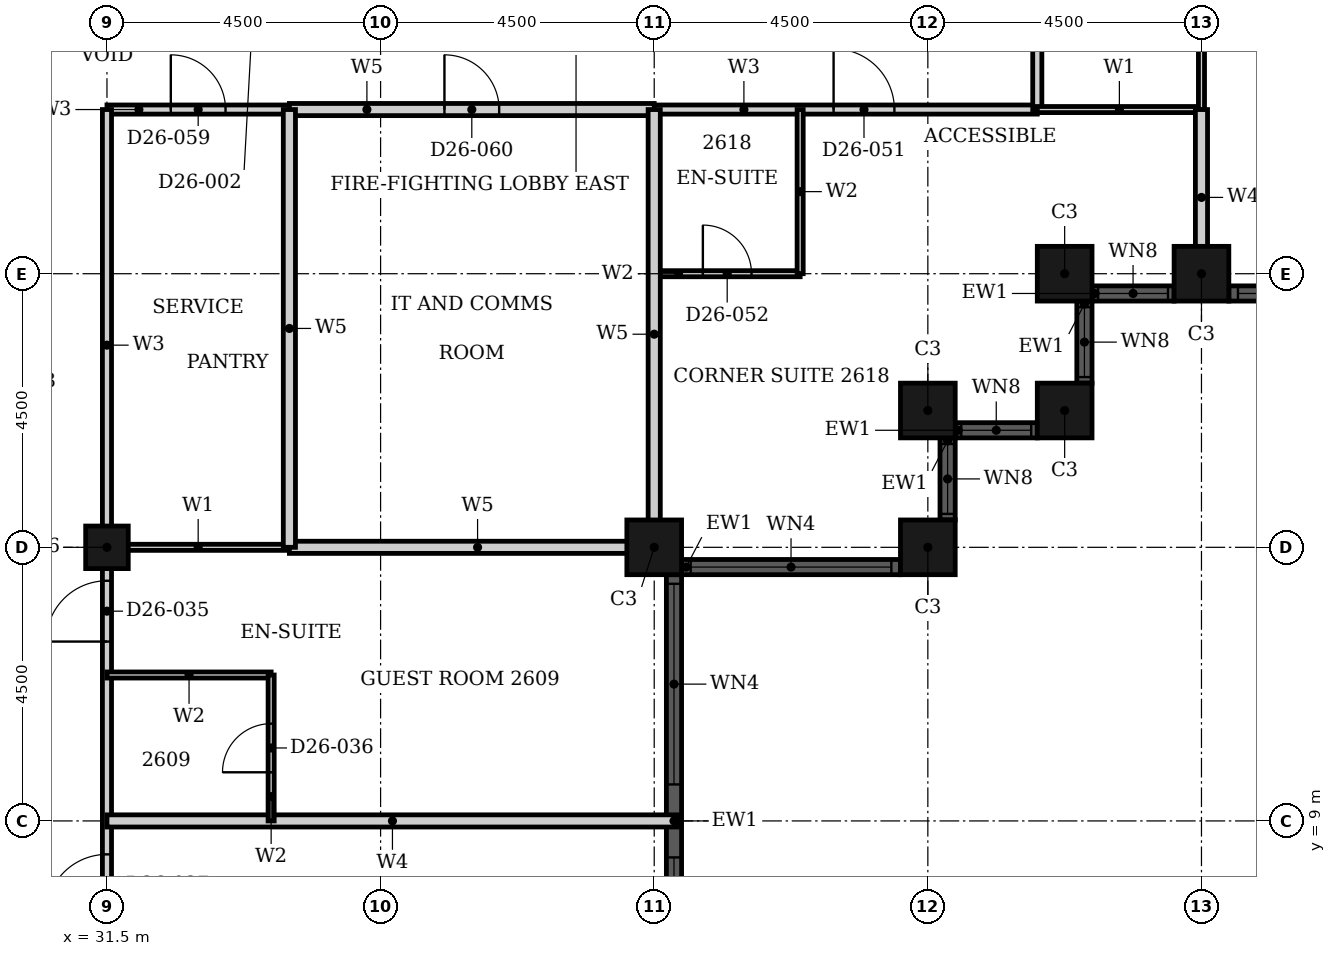
"""IFC4 building model, lengths in metres.
Left out: names, types, materials, properties, quantities, classifications, styles, units other than length and angle.
Written with IfcOpenShell. Run it as: python <this file> out.ifc"""

import sys

from ifc_helpers import new_model, si_unit, direction, frame, frame_2d, origin, origin_2d, place, context, subcontext, project, spatial, rectangle, hollow_rectangle, extrude, element, fill, save


model = new_model("IFC4")
c1 = context("Model", 3, precision=1e-05, world=origin(), true_north=direction((0.0, 1.0)))
c2 = subcontext(c1, "Body", "Model", "MODEL_VIEW")
j1 = project(units=[si_unit("LENGTHUNIT", "METRE"), si_unit("PLANEANGLEUNIT", "RADIAN")], contexts=[c1])
p1 = place(None, origin())
s1 = spatial("IfcSite", under=j1, at=p1, CompositionType="ELEMENT")
p2 = place(p1, origin())
s2 = spatial("IfcBuilding", under=s1, at=p2, CompositionType="ELEMENT")
p3 = place(p2, frame((0.0, 0.0, 108.0)))
s3 = spatial("IfcBuildingStorey", under=s2, at=p3, CompositionType="ELEMENT", Elevation=108.0)
for number, where, z_axis, x_axis in (
    (1, (40.5, 13.5, 0.0), (0.0, 0.0, 1.0), (1.0, 0.0, 0.0)),
    (2, (45.0, 13.5, 0.0), (0.0, 0.0, 1.0), (1.0, 0.0, 0.0)),
    (3, (45.0, 15.75, 0.0), (0.0, 0.0, 1.0), (1.0, 0.0, 0.0)),
    (4, (47.25, 15.75, 0.0), (0.0, 0.0, 1.0), (1.0, 0.0, 0.0)),
    (5, (47.25, 18.0, 0.0), (0.0, 0.0, 1.0), (1.0, 0.0, 0.0)),
    (6, (49.5, 18.0, 0.0), (0.0, 0.0, 1.0), (1.0, 0.0, 0.0)),
):
    element("IfcColumn", number, at=place(p3, frame(where, z_axis=z_axis, x_axis=x_axis)), inside=s3, PredefinedType="COLUMN", context=c2, shape_type="SweptSolid", body=[
        extrude(hollow_rectangle(XDim=0.9, YDim=0.9, WallThickness=0.028, at=origin_2d()), origin(), (0.0, 0.0, 1.0), 3.6),
    ])
p4 = place(p3, frame((31.5, 13.5, 0.0), z_axis=(0.0, 0.0, 1.0), x_axis=(1.0, 0.0, 0.0)))
e7 = element("IfcColumn", 7, at=p4, inside=s3, PredefinedType="COLUMN", context=c2, shape_type="SweptSolid", body=[
    extrude(hollow_rectangle(XDim=0.7, YDim=0.7, WallThickness=0.022, at=origin_2d()), origin(), (0.0, 0.0, 1.0), 3.6),
])
p5 = place(p3, frame((40.825, 4.95, 0.0), z_axis=(0.0, 0.0, 1.0), x_axis=(0.0, 1.0, 0.0)))
e8 = element("IfcWall", 8, at=p5, inside=s3, PredefinedType="SOLIDWALL", context=c2, shape_type="SweptSolid", body=[
    extrude(rectangle(XDim=8.1, YDim=0.25, at=frame_2d((4.05, 0.0))), origin(), (0.0, 0.0, 1.0), 3.6),
])
p6 = place(p5, frame((0.15, 0.0, 0.9)))
e9 = element("IfcOpeningElement", 9, at=p6, cuts=e8, PredefinedType="OPENING", context=c2, shape_type="SweptSolid", body=[
    extrude(rectangle(XDim=3.3, YDim=2.08, at=frame_2d((1.65, 1.04))), frame((0.0, 0.135, 0.0), z_axis=(0.0, -1.0, 0.0), x_axis=(1.0, 0.0, 0.0)), (0.0, 0.0, 1.0), 0.27),
])
p7 = place(p5, frame((4.65, 0.0, 0.9)))
e10 = element("IfcOpeningElement", 10, at=p7, cuts=e8, PredefinedType="OPENING", context=c2, shape_type="SweptSolid", body=[
    extrude(rectangle(XDim=3.3, YDim=2.08, at=frame_2d((1.65, 1.04))), frame((0.0, 0.135, 0.0), z_axis=(0.0, -1.0, 0.0), x_axis=(1.0, 0.0, 0.0)), (0.0, 0.0, 1.0), 0.27),
])
p8 = place(p3, frame((40.95, 13.175, 0.0), z_axis=(0.0, 0.0, 1.0), x_axis=(1.0, 0.0, 0.0)))
e11 = element("IfcWall", 11, at=p8, inside=s3, PredefinedType="SOLIDWALL", context=c2, shape_type="SweptSolid", body=[
    extrude(rectangle(XDim=3.6, YDim=0.25, at=frame_2d((1.8, 0.0))), origin(), (0.0, 0.0, 1.0), 3.6),
])
p9 = place(p8, frame((0.15, 0.0, 0.9)))
e12 = element("IfcOpeningElement", 12, at=p9, cuts=e11, PredefinedType="OPENING", context=c2, shape_type="SweptSolid", body=[
    extrude(rectangle(XDim=3.3, YDim=2.08, at=frame_2d((1.65, 1.04))), frame((0.0, 0.135, 0.0), z_axis=(0.0, -1.0, 0.0), x_axis=(1.0, 0.0, 0.0)), (0.0, 0.0, 1.0), 0.27),
])
p10 = place(p3, frame((45.325, 13.95, 0.0), z_axis=(0.0, 0.0, 1.0), x_axis=(0.0, 1.0, 0.0)))
e13 = element("IfcWall", 13, at=p10, inside=s3, PredefinedType="SOLIDWALL", context=c2, shape_type="SweptSolid", body=[
    extrude(rectangle(XDim=1.35, YDim=0.25, at=frame_2d((0.675, 0.0))), origin(), (0.0, 0.0, 1.0), 3.6),
])
p11 = place(p10, frame((0.1, 0.0, 0.9)))
e14 = element("IfcOpeningElement", 14, at=p11, cuts=e13, PredefinedType="OPENING", context=c2, shape_type="SweptSolid", body=[
    extrude(rectangle(XDim=1.15, YDim=2.08, at=frame_2d((0.575, 1.04))), frame((0.0, 0.135, 0.0), z_axis=(0.0, -1.0, 0.0), x_axis=(1.0, 0.0, 0.0)), (0.0, 0.0, 1.0), 0.27),
])
p12 = place(p3, frame((45.45, 15.425, 0.0), z_axis=(0.0, 0.0, 1.0), x_axis=(1.0, 0.0, 0.0)))
e15 = element("IfcWall", 15, at=p12, inside=s3, PredefinedType="SOLIDWALL", context=c2, shape_type="SweptSolid", body=[
    extrude(rectangle(XDim=1.35, YDim=0.25, at=frame_2d((0.675, 0.0))), origin(), (0.0, 0.0, 1.0), 3.6),
])
p13 = place(p12, frame((0.1, 0.0, 0.9)))
e16 = element("IfcOpeningElement", 16, at=p13, cuts=e15, PredefinedType="OPENING", context=c2, shape_type="SweptSolid", body=[
    extrude(rectangle(XDim=1.15, YDim=2.08, at=frame_2d((0.575, 1.04))), frame((0.0, 0.135, 0.0), z_axis=(0.0, -1.0, 0.0), x_axis=(1.0, 0.0, 0.0)), (0.0, 0.0, 1.0), 0.27),
])
p14 = place(p3, frame((47.575, 16.2, 0.0), z_axis=(0.0, 0.0, 1.0), x_axis=(0.0, 1.0, 0.0)))
e17 = element("IfcWall", 17, at=p14, inside=s3, PredefinedType="SOLIDWALL", context=c2, shape_type="SweptSolid", body=[
    extrude(rectangle(XDim=1.35, YDim=0.25, at=frame_2d((0.675, 0.0))), origin(), (0.0, 0.0, 1.0), 3.6),
])
p15 = place(p14, frame((0.1, 0.0, 0.9)))
e18 = element("IfcOpeningElement", 18, at=p15, cuts=e17, PredefinedType="OPENING", context=c2, shape_type="SweptSolid", body=[
    extrude(rectangle(XDim=1.15, YDim=2.08, at=frame_2d((0.575, 1.04))), frame((0.0, 0.135, 0.0), z_axis=(0.0, -1.0, 0.0), x_axis=(1.0, 0.0, 0.0)), (0.0, 0.0, 1.0), 0.27),
])
p16 = place(p3, frame((47.7, 17.675, 0.0), z_axis=(0.0, 0.0, 1.0), x_axis=(1.0, 0.0, 0.0)))
e19 = element("IfcWall", 19, at=p16, inside=s3, PredefinedType="SOLIDWALL", context=c2, shape_type="SweptSolid", body=[
    extrude(rectangle(XDim=1.35, YDim=0.25, at=frame_2d((0.675, 0.0))), origin(), (0.0, 0.0, 1.0), 3.6),
])
p17 = place(p16, frame((0.1, 0.0, 0.9)))
e20 = element("IfcOpeningElement", 20, at=p17, cuts=e19, PredefinedType="OPENING", context=c2, shape_type="SweptSolid", body=[
    extrude(rectangle(XDim=1.15, YDim=2.08, at=frame_2d((0.575, 1.04))), frame((0.0, 0.135, 0.0), z_axis=(0.0, -1.0, 0.0), x_axis=(1.0, 0.0, 0.0)), (0.0, 0.0, 1.0), 0.27),
])
p18 = place(p3, frame((49.95, 17.675, 0.0), z_axis=(0.0, 0.0, 1.0), x_axis=(1.0, 0.0, 0.0)))
e21 = element("IfcWall", 21, at=p18, inside=s3, PredefinedType="SOLIDWALL", context=c2, shape_type="SweptSolid", body=[
    extrude(rectangle(XDim=8.1, YDim=0.25, at=frame_2d((4.05, 0.0))), origin(), (0.0, 0.0, 1.0), 3.6),
])
p19 = place(p18, frame((0.15, 0.0, 0.9)))
e22 = element("IfcOpeningElement", 22, at=p19, cuts=e21, PredefinedType="OPENING", context=c2, shape_type="SweptSolid", body=[
    extrude(rectangle(XDim=3.3, YDim=2.08, at=frame_2d((1.65, 1.04))), frame((0.0, 0.135, 0.0), z_axis=(0.0, -1.0, 0.0), x_axis=(1.0, 0.0, 0.0)), (0.0, 0.0, 1.0), 0.27),
])
p20 = place(p18, frame((4.65, 0.0, 0.9)))
e23 = element("IfcOpeningElement", 23, at=p20, cuts=e21, PredefinedType="OPENING", context=c2, shape_type="SweptSolid", body=[
    extrude(rectangle(XDim=3.3, YDim=2.08, at=frame_2d((1.65, 1.04))), frame((0.0, 0.135, 0.0), z_axis=(0.0, -1.0, 0.0), x_axis=(1.0, 0.0, 0.0)), (0.0, 0.0, 1.0), 0.27),
])
p21 = place(p3, frame((40.5, 20.7, 0.0), z_axis=(0.0, 0.0, 1.0), x_axis=(1.0, 0.0, 0.0)))
e24 = element("IfcWall", 24, at=p21, inside=s3, PredefinedType="PARTITIONING", context=c2, shape_type="SweptSolid", body=[
    extrude(rectangle(XDim=6.3, YDim=0.15, at=frame_2d((3.15, 0.0))), origin(), (0.0, 0.0, 1.0), 3.3),
])
p22 = place(p21, frame((2.95, 0.0, 0.0)))
e25 = element("IfcOpeningElement", 25, at=p22, cuts=e24, PredefinedType="OPENING", context=c2, shape_type="SweptSolid", body=[
    extrude(rectangle(XDim=1.0, YDim=2.1, at=frame_2d((0.5, 1.05))), frame((0.0, 0.085, 0.0), z_axis=(0.0, -1.0, 0.0), x_axis=(1.0, 0.0, 0.0)), (0.0, 0.0, 1.0), 0.17),
])
p23 = place(p3, frame((31.5, 20.7, 0.0), z_axis=(0.0, 0.0, 1.0), x_axis=(1.0, 0.0, 0.0)))
e26 = element("IfcWall", 26, at=p23, inside=s3, PredefinedType="PARTITIONING", context=c2, shape_type="SweptSolid", body=[
    extrude(rectangle(XDim=3.0, YDim=0.15, at=frame_2d((1.5, 0.0))), origin(), (0.0, 0.0, 1.0), 3.3),
])
p24 = place(p23, frame((1.05, 0.0, 0.0)))
e27 = element("IfcOpeningElement", 27, at=p24, cuts=e26, PredefinedType="OPENING", context=c2, shape_type="SweptSolid", body=[
    extrude(rectangle(XDim=0.9, YDim=2.1, at=frame_2d((0.45, 1.05))), frame((0.0, 0.085, 0.0), z_axis=(0.0, -1.0, 0.0), x_axis=(1.0, 0.0, 0.0)), (0.0, 0.0, 1.0), 0.17),
])
p25 = place(p3, frame((31.5, 4.5, 0.0), z_axis=(0.0, 0.0, 1.0), x_axis=(0.0, 1.0, 0.0)))
e28 = element("IfcWall", 28, at=p25, inside=s3, PredefinedType="PARTITIONING", context=c2, shape_type="SweptSolid", body=[
    extrude(rectangle(XDim=16.2, YDim=0.15, at=frame_2d((8.1, 0.0))), origin(), (0.0, 0.0, 1.0), 2.58),
])
p26 = place(p25, frame((7.45, 0.0, 0.0)))
e29 = element("IfcOpeningElement", 29, at=p26, cuts=e28, PredefinedType="OPENING", context=c2, shape_type="SweptSolid", body=[
    extrude(rectangle(XDim=1.0, YDim=2.1, at=frame_2d((0.5, 1.05))), frame((0.0, 0.085, 0.0), z_axis=(0.0, -1.0, 0.0), x_axis=(1.0, 0.0, 0.0)), (0.0, 0.0, 1.0), 0.17),
])
p27 = place(p25, frame((2.95, 0.0, 0.0)))
e30 = element("IfcOpeningElement", 30, at=p27, cuts=e28, PredefinedType="OPENING", context=c2, shape_type="SweptSolid", body=[
    extrude(rectangle(XDim=1.0, YDim=2.1, at=frame_2d((0.5, 1.05))), frame((0.0, 0.085, 0.0), z_axis=(0.0, -1.0, 0.0), x_axis=(1.0, 0.0, 0.0)), (0.0, 0.0, 1.0), 0.17),
])
p28 = place(p3, frame((46.8, 20.7, 0.0), z_axis=(0.0, 0.0, 1.0), x_axis=(0.0, 1.0, 0.0)))
e31 = element("IfcWall", 31, at=p28, inside=s3, PredefinedType="PARTITIONING", context=c2, shape_type="SweptSolid", body=[
    extrude(rectangle(XDim=6.3, YDim=0.15, at=frame_2d((3.15, 0.0))), origin(), (0.0, 0.0, 1.0), 3.3),
])
p29 = place(p28, frame((2.625, 0.0, 0.0)))
e32 = element("IfcOpeningElement", 32, at=p29, cuts=e31, PredefinedType="OPENING", context=c2, shape_type="SweptSolid", body=[
    extrude(rectangle(XDim=0.95, YDim=2.1, at=frame_2d((0.475, 1.05))), frame((0.0, 0.085, 0.0), z_axis=(0.0, -1.0, 0.0), x_axis=(1.0, 0.0, 0.0)), (0.0, 0.0, 1.0), 0.17),
])
p30 = place(p3, frame((31.5, 13.5, 0.0), z_axis=(0.0, 0.0, 1.0), x_axis=(1.0, 0.0, 0.0)))
e33 = element("IfcWall", 33, at=p30, inside=s3, PredefinedType="PARTITIONING", context=c2, shape_type="SweptSolid", body=[
    extrude(rectangle(XDim=3.0, YDim=0.1, at=frame_2d((1.5, 0.0))), origin(), (0.0, 0.0, 1.0), 2.38),
])
p31 = place(p3, frame((46.8, 20.7, 0.0), z_axis=(0.0, 0.0, 1.0), x_axis=(1.0, 0.0, 0.0)))
e34 = element("IfcWall", 34, at=p31, inside=s3, PredefinedType="PARTITIONING", context=c2, shape_type="SweptSolid", body=[
    extrude(rectangle(XDim=2.7, YDim=0.1, at=frame_2d((1.35, 0.0))), origin(), (0.0, 0.0, 1.0), 3.3),
])
p32 = place(p3, frame((49.5, 20.7, 0.0), z_axis=(0.0, 0.0, 1.0), x_axis=(0.0, 1.0, 0.0)))
e35 = element("IfcWall", 35, at=p32, inside=s3, PredefinedType="PARTITIONING", context=c2, shape_type="SweptSolid", body=[
    extrude(rectangle(XDim=6.3, YDim=0.1, at=frame_2d((3.15, 0.0))), origin(), (0.0, 0.0, 1.0), 2.38),
])
p33 = place(p3, frame((31.5, 9.0, 0.0), z_axis=(0.0, 0.0, 1.0), x_axis=(1.0, 0.0, 0.0)))
e36 = element("IfcWall", 36, at=p33, inside=s3, PredefinedType="PARTITIONING", context=c2, shape_type="SweptSolid", body=[
    extrude(rectangle(XDim=9.39, YDim=0.2, at=frame_2d((4.695, 0.0))), origin(), (0.0, 0.0, 1.0), 3.3),
])
p34 = place(p3, frame((49.5, 17.81, 0.0), z_axis=(0.0, 0.0, 1.0), x_axis=(0.0, 1.0, 0.0)))
e37 = element("IfcWall", 37, at=p34, inside=s3, PredefinedType="PARTITIONING", context=c2, shape_type="SweptSolid", body=[
    extrude(rectangle(XDim=2.89, YDim=0.2, at=frame_2d((1.445, 0.0))), origin(), (0.0, 0.0, 1.0), 2.38),
])
p35 = place(p3, frame((31.5, 11.4, 0.0), z_axis=(0.0, 0.0, 1.0), x_axis=(1.0, 0.0, 0.0)))
e38 = element("IfcWall", 38, at=p35, inside=s3, PredefinedType="PARTITIONING", context=c2, shape_type="SweptSolid", body=[
    extrude(rectangle(XDim=2.7, YDim=0.1, at=frame_2d((1.35, 0.0))), origin(), (0.0, 0.0, 1.0), 3.3),
])
p36 = place(p3, frame((40.5, 18.0, 0.0), z_axis=(0.0, 0.0, 1.0), x_axis=(1.0, 0.0, 0.0)))
e39 = element("IfcWall", 39, at=p36, inside=s3, PredefinedType="PARTITIONING", context=c2, shape_type="SweptSolid", body=[
    extrude(rectangle(XDim=2.4, YDim=0.1, at=frame_2d((1.2, 0.0))), origin(), (0.0, 0.0, 1.0), 3.3),
])
p37 = place(p36, frame((0.8, 0.0, 0.0)))
e40 = element("IfcOpeningElement", 40, at=p37, cuts=e39, PredefinedType="OPENING", context=c2, shape_type="SweptSolid", body=[
    extrude(rectangle(XDim=0.8, YDim=2.1, at=frame_2d((0.4, 1.05))), frame((0.0, 0.06, 0.0), z_axis=(0.0, -1.0, 0.0), x_axis=(1.0, 0.0, 0.0)), (0.0, 0.0, 1.0), 0.12),
])
p38 = place(p3, frame((34.2, 9.0, 0.0), z_axis=(0.0, 0.0, 1.0), x_axis=(0.0, 1.0, 0.0)))
e41 = element("IfcWall", 41, at=p38, inside=s3, PredefinedType="PARTITIONING", context=c2, shape_type="SweptSolid", body=[
    extrude(rectangle(XDim=2.4, YDim=0.1, at=frame_2d((1.2, 0.0))), origin(), (0.0, 0.0, 1.0), 3.3),
])
p39 = place(p38, frame((0.8, 0.0, 0.0)))
e42 = element("IfcOpeningElement", 42, at=p39, cuts=e41, PredefinedType="OPENING", context=c2, shape_type="SweptSolid", body=[
    extrude(rectangle(XDim=0.8, YDim=2.1, at=frame_2d((0.4, 1.05))), frame((0.0, 0.06, 0.0), z_axis=(0.0, -1.0, 0.0), x_axis=(1.0, 0.0, 0.0)), (0.0, 0.0, 1.0), 0.12),
])
p40 = place(p3, frame((42.9, 18.0, 0.0), z_axis=(0.0, 0.0, 1.0), x_axis=(0.0, 1.0, 0.0)))
e43 = element("IfcWall", 43, at=p40, inside=s3, PredefinedType="PARTITIONING", context=c2, shape_type="SweptSolid", body=[
    extrude(rectangle(XDim=2.7, YDim=0.1, at=frame_2d((1.35, 0.0))), origin(), (0.0, 0.0, 1.0), 3.3),
])
p41 = place(p3, frame((34.5, 13.5, 0.0), z_axis=(0.0, 0.0, 1.0), x_axis=(1.0, 0.0, 0.0)))
e44 = element("IfcWall", 44, at=p41, inside=s3, PredefinedType="PARTITIONING", context=c2, shape_type="SweptSolid", body=[
    extrude(rectangle(XDim=6.19, YDim=0.2, at=frame_2d((3.095, 0.0))), origin(), (0.0, 0.0, 1.0), 2.38),
])
p42 = place(p3, frame((34.5, 20.7, 0.0), z_axis=(0.0, 0.0, 1.0), x_axis=(1.0, 0.0, 0.0)))
e45 = element("IfcWall", 45, at=p42, inside=s3, PredefinedType="PARTITIONING", context=c2, shape_type="SweptSolid", body=[
    extrude(rectangle(XDim=6.0, YDim=0.2, at=frame_2d((3.0, 0.0))), origin(), (0.0, 0.0, 1.0), 3.3),
])
p43 = place(p42, frame((2.55, 0.0, 0.0)))
e46 = element("IfcOpeningElement", 46, at=p43, cuts=e45, PredefinedType="OPENING", context=c2, shape_type="SweptSolid", body=[
    extrude(rectangle(XDim=0.9, YDim=2.1, at=frame_2d((0.45, 1.05))), frame((0.0, 0.11, 0.0), z_axis=(0.0, -1.0, 0.0), x_axis=(1.0, 0.0, 0.0)), (0.0, 0.0, 1.0), 0.22),
])
p44 = place(p3, frame((34.5, 13.5, 0.0), z_axis=(0.0, 0.0, 1.0), x_axis=(0.0, 1.0, 0.0)))
e47 = element("IfcWall", 47, at=p44, inside=s3, PredefinedType="PARTITIONING", context=c2, shape_type="SweptSolid", body=[
    extrude(rectangle(XDim=7.2, YDim=0.2, at=frame_2d((3.6, 0.0))), origin(), (0.0, 0.0, 1.0), 3.3),
])
p45 = place(p3, frame((40.5, 13.31, 0.0), z_axis=(0.0, 0.0, 1.0), x_axis=(0.0, 1.0, 0.0)))
e48 = element("IfcWall", 48, at=p45, inside=s3, PredefinedType="PARTITIONING", context=c2, shape_type="SweptSolid", body=[
    extrude(rectangle(XDim=7.39, YDim=0.2, at=frame_2d((3.695, 0.0))), origin(), (0.0, 0.0, 1.0), 3.3),
])
p46 = place(p6, origin())
e49 = element("IfcWindow", 49, at=p46, inside=s3, PartitioningType="SINGLE_PANEL", PredefinedType="WINDOW", context=c2, shape_type="SweptSolid", body=[
    extrude(rectangle(XDim=3.3, YDim=2.08, at=frame_2d((1.65, 1.04))), frame((0.0, 0.03, 0.0), z_axis=(0.0, -1.0, 0.0), x_axis=(1.0, 0.0, 0.0)), (0.0, 0.0, 1.0), 0.06),
])
fill(e9, e49)
p47 = place(p7, origin())
e50 = element("IfcWindow", 50, at=p47, inside=s3, PartitioningType="SINGLE_PANEL", PredefinedType="WINDOW", context=c2, shape_type="SweptSolid", body=[
    extrude(rectangle(XDim=3.3, YDim=2.08, at=frame_2d((1.65, 1.04))), frame((0.0, 0.03, 0.0), z_axis=(0.0, -1.0, 0.0), x_axis=(1.0, 0.0, 0.0)), (0.0, 0.0, 1.0), 0.06),
])
fill(e10, e50)
p48 = place(p9, origin())
e51 = element("IfcWindow", 51, at=p48, inside=s3, PartitioningType="SINGLE_PANEL", PredefinedType="WINDOW", context=c2, shape_type="SweptSolid", body=[
    extrude(rectangle(XDim=3.3, YDim=2.08, at=frame_2d((1.65, 1.04))), frame((0.0, 0.03, 0.0), z_axis=(0.0, -1.0, 0.0), x_axis=(1.0, 0.0, 0.0)), (0.0, 0.0, 1.0), 0.06),
])
fill(e12, e51)
p49 = place(p11, origin())
e52 = element("IfcWindow", 52, at=p49, inside=s3, PartitioningType="SINGLE_PANEL", PredefinedType="WINDOW", context=c2, shape_type="SweptSolid", body=[
    extrude(rectangle(XDim=1.15, YDim=2.08, at=frame_2d((0.575, 1.04))), frame((0.0, 0.03, 0.0), z_axis=(0.0, -1.0, 0.0), x_axis=(1.0, 0.0, 0.0)), (0.0, 0.0, 1.0), 0.06),
])
fill(e14, e52)
p50 = place(p13, origin())
e53 = element("IfcWindow", 53, at=p50, inside=s3, PartitioningType="SINGLE_PANEL", PredefinedType="WINDOW", context=c2, shape_type="SweptSolid", body=[
    extrude(rectangle(XDim=1.15, YDim=2.08, at=frame_2d((0.575, 1.04))), frame((0.0, 0.03, 0.0), z_axis=(0.0, -1.0, 0.0), x_axis=(1.0, 0.0, 0.0)), (0.0, 0.0, 1.0), 0.06),
])
fill(e16, e53)
p51 = place(p15, origin())
e54 = element("IfcWindow", 54, at=p51, inside=s3, PartitioningType="SINGLE_PANEL", PredefinedType="WINDOW", context=c2, shape_type="SweptSolid", body=[
    extrude(rectangle(XDim=1.15, YDim=2.08, at=frame_2d((0.575, 1.04))), frame((0.0, 0.03, 0.0), z_axis=(0.0, -1.0, 0.0), x_axis=(1.0, 0.0, 0.0)), (0.0, 0.0, 1.0), 0.06),
])
fill(e18, e54)
p52 = place(p17, origin())
e55 = element("IfcWindow", 55, at=p52, inside=s3, PartitioningType="SINGLE_PANEL", PredefinedType="WINDOW", context=c2, shape_type="SweptSolid", body=[
    extrude(rectangle(XDim=1.15, YDim=2.08, at=frame_2d((0.575, 1.04))), frame((0.0, 0.03, 0.0), z_axis=(0.0, -1.0, 0.0), x_axis=(1.0, 0.0, 0.0)), (0.0, 0.0, 1.0), 0.06),
])
fill(e20, e55)
p53 = place(p19, origin())
e56 = element("IfcWindow", 56, at=p53, inside=s3, PartitioningType="SINGLE_PANEL", PredefinedType="WINDOW", context=c2, shape_type="SweptSolid", body=[
    extrude(rectangle(XDim=3.3, YDim=2.08, at=frame_2d((1.65, 1.04))), frame((0.0, 0.03, 0.0), z_axis=(0.0, -1.0, 0.0), x_axis=(1.0, 0.0, 0.0)), (0.0, 0.0, 1.0), 0.06),
])
fill(e22, e56)
p54 = place(p26, origin())
e57 = element("IfcDoor", 57, at=p54, inside=s3, OperationType="SINGLE_SWING_RIGHT", PredefinedType="DOOR", context=c2, shape_type="SweptSolid", body=[
    extrude(rectangle(XDim=1.0, YDim=2.1, at=frame_2d((0.5, 1.05))), frame((0.0, 0.025, 0.0), z_axis=(0.0, -1.0, 0.0), x_axis=(1.0, 0.0, 0.0)), (0.0, 0.0, 1.0), 0.05),
])
fill(e29, e57)
p55 = place(p39, origin())
e58 = element("IfcDoor", 58, at=p55, inside=s3, OperationType="SINGLE_SWING_RIGHT", PredefinedType="DOOR", context=c2, shape_type="SweptSolid", body=[
    extrude(rectangle(XDim=0.8, YDim=2.1, at=frame_2d((0.4, 1.05))), frame((0.0, 0.025, 0.0), z_axis=(0.0, -1.0, 0.0), x_axis=(1.0, 0.0, 0.0)), (0.0, 0.0, 1.0), 0.05),
])
fill(e42, e58)
p56 = place(p27, origin())
e59 = element("IfcDoor", 59, at=p56, inside=s3, OperationType="SINGLE_SWING_RIGHT", PredefinedType="DOOR", context=c2, shape_type="SweptSolid", body=[
    extrude(rectangle(XDim=1.0, YDim=2.1, at=frame_2d((0.5, 1.05))), frame((0.0, 0.025, 0.0), z_axis=(0.0, -1.0, 0.0), x_axis=(1.0, 0.0, 0.0)), (0.0, 0.0, 1.0), 0.05),
])
fill(e30, e59)
p57 = place(p22, origin())
e60 = element("IfcDoor", 60, at=p57, inside=s3, OperationType="SINGLE_SWING_RIGHT", PredefinedType="DOOR", context=c2, shape_type="SweptSolid", body=[
    extrude(rectangle(XDim=1.0, YDim=2.1, at=frame_2d((0.5, 1.05))), frame((0.0, 0.025, 0.0), z_axis=(0.0, -1.0, 0.0), x_axis=(1.0, 0.0, 0.0)), (0.0, 0.0, 1.0), 0.05),
])
fill(e25, e60)
p58 = place(p37, origin())
e61 = element("IfcDoor", 61, at=p58, inside=s3, OperationType="SINGLE_SWING_LEFT", PredefinedType="DOOR", context=c2, shape_type="SweptSolid", body=[
    extrude(rectangle(XDim=0.8, YDim=2.1, at=frame_2d((0.4, 1.05))), frame((0.0, 0.025, 0.0), z_axis=(0.0, -1.0, 0.0), x_axis=(1.0, 0.0, 0.0)), (0.0, 0.0, 1.0), 0.05),
])
fill(e40, e61)
p59 = place(p24, origin())
e62 = element("IfcDoor", 62, at=p59, inside=s3, OperationType="SINGLE_SWING_LEFT", PredefinedType="DOOR", context=c2, shape_type="SweptSolid", body=[
    extrude(rectangle(XDim=0.9, YDim=2.1, at=frame_2d((0.45, 1.05))), frame((0.0, 0.025, 0.0), z_axis=(0.0, -1.0, 0.0), x_axis=(1.0, 0.0, 0.0)), (0.0, 0.0, 1.0), 0.05),
])
fill(e27, e62)
p60 = place(p43, origin())
e63 = element("IfcDoor", 63, at=p60, inside=s3, OperationType="SINGLE_SWING_LEFT", PredefinedType="DOOR", context=c2, shape_type="SweptSolid", body=[
    extrude(rectangle(XDim=0.9, YDim=2.1, at=frame_2d((0.45, 1.05))), frame((0.0, 0.025, 0.0), z_axis=(0.0, -1.0, 0.0), x_axis=(1.0, 0.0, 0.0)), (0.0, 0.0, 1.0), 0.05),
])
fill(e46, e63)
save(model, sys.argv[1])
